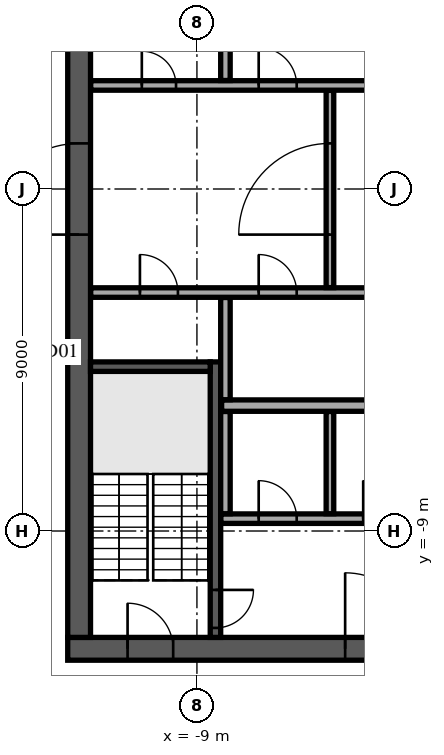
"""IFC4 building model, lengths in metres.
Left out: names, types, materials, properties, quantities, classifications, styles, units other than length and angle.
Written with IfcOpenShell. Run it as: python <this file> out.ifc"""

import sys

from ifc_helpers import new_model, si_unit, direction, frame, frame_2d, origin, place, context, subcontext, project, spatial, rectangle, extrude, element, fill, save


model = new_model("IFC4")
c1 = context("Model", 3, precision=1e-05, world=origin(), true_north=direction((0.0, 1.0)))
c2 = subcontext(c1, "Body", "Model", "MODEL_VIEW")
j1 = project(units=[si_unit("LENGTHUNIT", "METRE"), si_unit("PLANEANGLEUNIT", "RADIAN")], contexts=[c1])
p1 = place(None, origin())
s1 = spatial("IfcSite", under=j1, at=p1, CompositionType="ELEMENT")
p2 = place(p1, origin())
s2 = spatial("IfcBuilding", under=s1, at=p2, CompositionType="ELEMENT")
p3 = place(p2, frame((0.0, 0.0, 296.5)))
s3 = spatial("IfcBuildingStorey", under=s2, at=p3, CompositionType="ELEMENT", Elevation=296.5)
p4 = place(p3, frame((-12.4, -12.1, 0.0), z_axis=(0.0, 0.0, 1.0), x_axis=(1.0, 0.0, 0.0)))
e1 = element("IfcWall", 1, at=p4, inside=s3, PredefinedType="SHEAR", context=c2, shape_type="SweptSolid", body=[
    extrude(rectangle(XDim=24.8, YDim=0.6, at=frame_2d((12.4, 0.0))), origin(), (0.0, 0.0, 1.0), 3.65),
])
p5 = place(p4, frame((7.3, 0.0, 0.0)))
e2 = element("IfcOpeningElement", 2, at=p5, cuts=e1, PredefinedType="OPENING", context=c2, shape_type="SweptSolid", body=[
    extrude(rectangle(XDim=2.0, YDim=2.1, at=frame_2d((1.0, 1.05))), frame((0.0, 0.31, 0.0), z_axis=(0.0, -1.0, 0.0), x_axis=(1.0, 0.0, 0.0)), (0.0, 0.0, 1.0), 0.62),
])
p6 = place(p4, frame((17.425, 0.0, 0.0)))
e3 = element("IfcOpeningElement", 3, at=p6, cuts=e1, PredefinedType="OPENING", context=c2, shape_type="SweptSolid", body=[
    extrude(rectangle(XDim=1.2, YDim=2.1, at=frame_2d((0.6, 1.05))), frame((0.0, 0.31, 0.0), z_axis=(0.0, -1.0, 0.0), x_axis=(1.0, 0.0, 0.0)), (0.0, 0.0, 1.0), 0.62),
])
p7 = place(p4, frame((1.575, 0.0, 0.0)))
e4 = element("IfcOpeningElement", 4, at=p7, cuts=e1, PredefinedType="OPENING", context=c2, shape_type="SweptSolid", body=[
    extrude(rectangle(XDim=1.2, YDim=2.1, at=frame_2d((0.6, 1.05))), frame((0.0, 0.31, 0.0), z_axis=(0.0, -1.0, 0.0), x_axis=(1.0, 0.0, 0.0)), (0.0, 0.0, 1.0), 0.62),
])
p8 = place(p4, frame((22.025, 0.0, 0.0)))
e5 = element("IfcOpeningElement", 5, at=p8, cuts=e1, PredefinedType="OPENING", context=c2, shape_type="SweptSolid", body=[
    extrude(rectangle(XDim=1.2, YDim=2.1, at=frame_2d((0.6, 1.05))), frame((0.0, 0.31, 0.0), z_axis=(0.0, -1.0, 0.0), x_axis=(1.0, 0.0, 0.0)), (0.0, 0.0, 1.0), 0.62),
])
p9 = place(p3, frame((-12.1, -11.8, 0.0), z_axis=(0.0, 0.0, 1.0), x_axis=(0.0, 1.0, 0.0)))
e6 = element("IfcWall", 6, at=p9, inside=s3, PredefinedType="SHEAR", context=c2, shape_type="SweptSolid", body=[
    extrude(rectangle(XDim=23.6, YDim=0.6, at=frame_2d((11.8, 0.0))), origin(), (0.0, 0.0, 1.0), 3.65),
])
p10 = place(p9, frame((10.6, 0.0, 0.0)))
e7 = element("IfcOpeningElement", 7, at=p10, cuts=e6, PredefinedType="OPENING", context=c2, shape_type="SweptSolid", body=[
    extrude(rectangle(XDim=2.4, YDim=2.4, at=frame_2d((1.2, 1.2))), frame((0.0, 0.31, 0.0), z_axis=(0.0, -1.0, 0.0), x_axis=(1.0, 0.0, 0.0)), (0.0, 0.0, 1.0), 0.62),
])
p11 = place(p3, frame((-8.512, -4.55, 0.0), z_axis=(0.0, 0.0, 1.0), x_axis=(0.0, -1.0, 0.0)))
e8 = element("IfcWall", 8, at=p11, inside=s3, PredefinedType="SOLIDWALL", context=c2, shape_type="SweptSolid", body=[
    extrude(rectangle(XDim=7.25, YDim=0.275, at=frame_2d((3.625, 0.0))), origin(), (0.0, 0.0, 1.0), 3.65),
])
p12 = place(p11, frame((6.0, 0.0, 0.0)))
e9 = element("IfcOpeningElement", 9, at=p12, cuts=e8, PredefinedType="OPENING", context=c2, shape_type="SweptSolid", body=[
    extrude(rectangle(XDim=1.0, YDim=2.1, at=frame_2d((0.5, 1.05))), frame((0.0, 0.147, 0.0), z_axis=(0.0, -1.0, 0.0), x_axis=(1.0, 0.0, 0.0)), (0.0, 0.0, 1.0), 0.295),
])
p13 = place(p3, frame((-8.65, -4.675, 0.0), z_axis=(0.0, 0.0, 1.0), x_axis=(-1.0, 0.0, 0.0)))
e10 = element("IfcWall", 10, at=p13, inside=s3, PredefinedType="SOLIDWALL", context=c2, shape_type="SweptSolid", body=[
    extrude(rectangle(XDim=3.15, YDim=0.25, at=frame_2d((1.575, 0.0))), origin(), (0.0, 0.0, 1.0), 3.65),
])
p14 = place(p3, frame((-8.37, -8.675, 0.0), z_axis=(0.0, 0.0, 1.0), x_axis=(1.0, 0.0, 0.0)))
e11 = element("IfcWall", 11, at=p14, inside=s3, PredefinedType="PARTITIONING", context=c2, shape_type="SweptSolid", body=[
    extrude(rectangle(XDim=5.49, YDim=0.25, at=frame_2d((2.745, 0.0))), origin(), (0.0, 0.0, 1.0), 3.65),
])
p15 = place(p14, frame((0.995, 0.0, 0.0)))
e12 = element("IfcOpeningElement", 12, at=p15, cuts=e11, PredefinedType="OPENING", context=c2, shape_type="SweptSolid", body=[
    extrude(rectangle(XDim=1.0, YDim=2.1, at=frame_2d((0.5, 1.05))), frame((0.0, 0.135, 0.0), z_axis=(0.0, -1.0, 0.0), x_axis=(1.0, 0.0, 0.0)), (0.0, 0.0, 1.0), 0.27),
])
p16 = place(p14, frame((3.745, 0.0, 0.0)))
e13 = element("IfcOpeningElement", 13, at=p16, cuts=e11, PredefinedType="OPENING", context=c2, shape_type="SweptSolid", body=[
    extrude(rectangle(XDim=1.0, YDim=2.1, at=frame_2d((0.5, 1.05))), frame((0.0, 0.135, 0.0), z_axis=(0.0, -1.0, 0.0), x_axis=(1.0, 0.0, 0.0)), (0.0, 0.0, 1.0), 0.27),
])
p17 = place(p3, frame((-8.25, -8.545, 0.0), z_axis=(0.0, 0.0, 1.0), x_axis=(0.0, 1.0, 0.0)))
e14 = element("IfcWall", 14, at=p17, inside=s3, PredefinedType="PARTITIONING", context=c2, shape_type="SweptSolid", body=[
    extrude(rectangle(XDim=2.69, YDim=0.25, at=frame_2d((1.345, 0.0))), origin(), (0.0, 0.0, 1.0), 3.65),
])
p18 = place(p3, frame((-5.5, -8.545, 0.0), z_axis=(0.0, 0.0, 1.0), x_axis=(0.0, 1.0, 0.0)))
e15 = element("IfcWall", 15, at=p18, inside=s3, PredefinedType="PARTITIONING", context=c2, shape_type="SweptSolid", body=[
    extrude(rectangle(XDim=2.69, YDim=0.2, at=frame_2d((1.345, 0.0))), origin(), (0.0, 0.0, 1.0), 3.65),
])
p19 = place(p3, frame((-8.35, -5.7, 0.0), z_axis=(0.0, 0.0, 1.0), x_axis=(1.0, 0.0, 0.0)))
e16 = element("IfcWall", 16, at=p19, inside=s3, PredefinedType="PARTITIONING", context=c2, shape_type="SweptSolid", body=[
    extrude(rectangle(XDim=5.47, YDim=0.3, at=frame_2d((2.735, 0.0))), origin(), (0.0, 0.0, 1.0), 3.65),
])
p20 = place(p3, frame((-8.25, -5.545, 0.0), z_axis=(0.0, 0.0, 1.0), x_axis=(0.0, 1.0, 0.0)))
e17 = element("IfcWall", 17, at=p20, inside=s3, PredefinedType="PARTITIONING", context=c2, shape_type="SweptSolid", body=[
    extrude(rectangle(XDim=2.69, YDim=0.25, at=frame_2d((1.345, 0.0))), origin(), (0.0, 0.0, 1.0), 3.65),
])
p21 = place(p3, frame((-11.795, -2.725, 0.0), z_axis=(0.0, 0.0, 1.0), x_axis=(1.0, 0.0, 0.0)))
e18 = element("IfcWall", 18, at=p21, inside=s3, PredefinedType="PARTITIONING", context=c2, shape_type="SweptSolid", body=[
    extrude(rectangle(XDim=14.415, YDim=0.25, at=frame_2d((7.208, 0.0))), origin(), (0.0, 0.0, 1.0), 3.65),
])
p22 = place(p21, frame((1.295, 0.0, 0.0)))
e19 = element("IfcOpeningElement", 19, at=p22, cuts=e18, PredefinedType="OPENING", context=c2, shape_type="SweptSolid", body=[
    extrude(rectangle(XDim=1.0, YDim=2.1, at=frame_2d((0.5, 1.05))), frame((0.0, 0.135, 0.0), z_axis=(0.0, -1.0, 0.0), x_axis=(1.0, 0.0, 0.0)), (0.0, 0.0, 1.0), 0.27),
])
p23 = place(p21, frame((4.42, 0.0, 0.0)))
e20 = element("IfcOpeningElement", 20, at=p23, cuts=e18, PredefinedType="OPENING", context=c2, shape_type="SweptSolid", body=[
    extrude(rectangle(XDim=1.0, YDim=2.1, at=frame_2d((0.5, 1.05))), frame((0.0, 0.135, 0.0), z_axis=(0.0, -1.0, 0.0), x_axis=(1.0, 0.0, 0.0)), (0.0, 0.0, 1.0), 0.27),
])
p24 = place(p21, frame((9.92, 0.0, 0.0)))
e21 = element("IfcOpeningElement", 21, at=p24, cuts=e18, PredefinedType="OPENING", context=c2, shape_type="SweptSolid", body=[
    extrude(rectangle(XDim=1.0, YDim=2.1, at=frame_2d((0.5, 1.05))), frame((0.0, 0.135, 0.0), z_axis=(0.0, -1.0, 0.0), x_axis=(1.0, 0.0, 0.0)), (0.0, 0.0, 1.0), 0.27),
])
p25 = place(p3, frame((-5.5, -2.595, 0.0), z_axis=(0.0, 0.0, 1.0), x_axis=(0.0, 1.0, 0.0)))
e22 = element("IfcWall", 22, at=p25, inside=s3, PredefinedType="PARTITIONING", context=c2, shape_type="SweptSolid", body=[
    extrude(rectangle(XDim=5.19, YDim=0.2, at=frame_2d((2.595, 0.0))), origin(), (0.0, 0.0, 1.0), 3.65),
])
p26 = place(p25, frame((1.395, 0.0, 0.0)))
e23 = element("IfcOpeningElement", 23, at=p26, cuts=e22, PredefinedType="OPENING", context=c2, shape_type="SweptSolid", body=[
    extrude(rectangle(XDim=2.4, YDim=2.4, at=frame_2d((1.2, 1.2))), frame((0.0, 0.11, 0.0), z_axis=(0.0, -1.0, 0.0), x_axis=(1.0, 0.0, 0.0)), (0.0, 0.0, 1.0), 0.22),
])
p27 = place(p3, frame((-11.795, 2.725, 0.0), z_axis=(0.0, 0.0, 1.0), x_axis=(1.0, 0.0, 0.0)))
e24 = element("IfcWall", 24, at=p27, inside=s3, PredefinedType="PARTITIONING", context=c2, shape_type="SweptSolid", body=[
    extrude(rectangle(XDim=23.59, YDim=0.25, at=frame_2d((11.795, 0.0))), origin(), (0.0, 0.0, 1.0), 3.65),
])
p28 = place(p27, frame((21.345, 0.0, 0.0)))
e25 = element("IfcOpeningElement", 25, at=p28, cuts=e24, PredefinedType="OPENING", context=c2, shape_type="SweptSolid", body=[
    extrude(rectangle(XDim=0.9, YDim=2.1, at=frame_2d((0.45, 1.05))), frame((0.0, 0.135, 0.0), z_axis=(0.0, -1.0, 0.0), x_axis=(1.0, 0.0, 0.0)), (0.0, 0.0, 1.0), 0.27),
])
p29 = place(p27, frame((1.345, 0.0, 0.0)))
e26 = element("IfcOpeningElement", 26, at=p29, cuts=e24, PredefinedType="OPENING", context=c2, shape_type="SweptSolid", body=[
    extrude(rectangle(XDim=0.9, YDim=2.1, at=frame_2d((0.45, 1.05))), frame((0.0, 0.135, 0.0), z_axis=(0.0, -1.0, 0.0), x_axis=(1.0, 0.0, 0.0)), (0.0, 0.0, 1.0), 0.27),
])
p30 = place(p27, frame((4.42, 0.0, 0.0)))
e27 = element("IfcOpeningElement", 27, at=p30, cuts=e24, PredefinedType="OPENING", context=c2, shape_type="SweptSolid", body=[
    extrude(rectangle(XDim=1.0, YDim=2.1, at=frame_2d((0.5, 1.05))), frame((0.0, 0.135, 0.0), z_axis=(0.0, -1.0, 0.0), x_axis=(1.0, 0.0, 0.0)), (0.0, 0.0, 1.0), 0.27),
])
p31 = place(p27, frame((9.82, 0.0, 0.0)))
e28 = element("IfcOpeningElement", 28, at=p31, cuts=e24, PredefinedType="OPENING", context=c2, shape_type="SweptSolid", body=[
    extrude(rectangle(XDim=1.2, YDim=2.1, at=frame_2d((0.6, 1.05))), frame((0.0, 0.135, 0.0), z_axis=(0.0, -1.0, 0.0), x_axis=(1.0, 0.0, 0.0)), (0.0, 0.0, 1.0), 0.27),
])
p32 = place(p3, frame((-8.25, 2.855, 0.0), z_axis=(0.0, 0.0, 1.0), x_axis=(0.0, 1.0, 0.0)))
e29 = element("IfcWall", 29, at=p32, inside=s3, PredefinedType="PARTITIONING", context=c2, shape_type="SweptSolid", body=[
    extrude(rectangle(XDim=1.715, YDim=0.25, at=frame_2d((0.857, 0.0))), origin(), (0.0, 0.0, 1.0), 3.65),
])
p33 = place(p3, frame((-23.896, -11.711, 0.0), z_axis=(0.0, 0.0, 1.0), x_axis=(0.920507643781, -0.390724554821, 0.0)))
e30 = element("IfcWall", 30, at=p33, inside=s3, PredefinedType="PARTITIONING", context=c2, shape_type="SweptSolid", body=[
    extrude(rectangle(XDim=34.917, YDim=0.15, at=frame_2d((17.458, 0.0))), origin(), (0.0, 0.0, 1.0), 3.25),
])
p34 = place(p33, frame((7.05, 0.0, 0.0)))
e31 = element("IfcOpeningElement", 31, at=p34, cuts=e30, PredefinedType="OPENING", context=c2, shape_type="SweptSolid", body=[
    extrude(rectangle(XDim=1.8, YDim=2.1, at=frame_2d((0.9, 1.05))), frame((0.0, 0.085, 0.0), z_axis=(0.0, -1.0, 0.0), x_axis=(1.0, 0.0, 0.0)), (0.0, 0.0, 1.0), 0.17),
])
p35 = place(p33, frame((14.27, 0.0, 0.0)))
e32 = element("IfcOpeningElement", 32, at=p35, cuts=e30, PredefinedType="OPENING", context=c2, shape_type="SweptSolid", body=[
    extrude(rectangle(XDim=1.0, YDim=2.1, at=frame_2d((0.5, 1.05))), frame((0.0, 0.085, 0.0), z_axis=(0.0, -1.0, 0.0), x_axis=(1.0, 0.0, 0.0)), (0.0, 0.0, 1.0), 0.17),
])
p36 = place(p33, frame((29.011, 0.0, 0.0)))
e33 = element("IfcOpeningElement", 33, at=p36, cuts=e30, PredefinedType="OPENING", context=c2, shape_type="SweptSolid", body=[
    extrude(rectangle(XDim=1.0, YDim=2.1, at=frame_2d((0.5, 1.05))), frame((0.0, 0.085, 0.0), z_axis=(0.0, -1.0, 0.0), x_axis=(1.0, 0.0, 0.0)), (0.0, 0.0, 1.0), 0.17),
])
p37 = place(p5, origin())
e34 = element("IfcDoor", 34, at=p37, inside=s3, OperationType="SINGLE_SWING_LEFT", PredefinedType="DOOR", context=c2, shape_type="SweptSolid", body=[
    extrude(rectangle(XDim=2.0, YDim=2.1, at=frame_2d((1.0, 1.05))), frame((0.0, 0.025, 0.0), z_axis=(0.0, -1.0, 0.0), x_axis=(1.0, 0.0, 0.0)), (0.0, 0.0, 1.0), 0.05),
])
fill(e2, e34)
p38 = place(p7, origin())
e35 = element("IfcDoor", 35, at=p38, inside=s3, OperationType="SINGLE_SWING_LEFT", PredefinedType="DOOR", context=c2, shape_type="SweptSolid", body=[
    extrude(rectangle(XDim=1.2, YDim=2.1, at=frame_2d((0.6, 1.05))), frame((0.0, 0.025, 0.0), z_axis=(0.0, -1.0, 0.0), x_axis=(1.0, 0.0, 0.0)), (0.0, 0.0, 1.0), 0.05),
])
fill(e4, e35)
p39 = place(p10, origin())
e36 = element("IfcDoor", 36, at=p39, inside=s3, OperationType="SINGLE_SWING_LEFT", PredefinedType="DOOR", context=c2, shape_type="SweptSolid", body=[
    extrude(rectangle(XDim=2.4, YDim=2.4, at=frame_2d((1.2, 1.2))), frame((0.0, 0.025, 0.0), z_axis=(0.0, -1.0, 0.0), x_axis=(1.0, 0.0, 0.0)), (0.0, 0.0, 1.0), 0.05),
])
fill(e7, e36)
p40 = place(p12, origin())
e37 = element("IfcDoor", 37, at=p40, inside=s3, OperationType="SINGLE_SWING_LEFT", PredefinedType="DOOR", context=c2, shape_type="SweptSolid", body=[
    extrude(rectangle(XDim=1.0, YDim=2.1, at=frame_2d((0.5, 1.05))), frame((0.0, 0.025, 0.0), z_axis=(0.0, -1.0, 0.0), x_axis=(1.0, 0.0, 0.0)), (0.0, 0.0, 1.0), 0.05),
])
fill(e9, e37)
p41 = place(p15, origin())
e38 = element("IfcDoor", 38, at=p41, inside=s3, OperationType="SINGLE_SWING_LEFT", PredefinedType="DOOR", context=c2, shape_type="SweptSolid", body=[
    extrude(rectangle(XDim=1.0, YDim=2.1, at=frame_2d((0.5, 1.05))), frame((0.0, 0.025, 0.0), z_axis=(0.0, -1.0, 0.0), x_axis=(1.0, 0.0, 0.0)), (0.0, 0.0, 1.0), 0.05),
])
fill(e12, e38)
p42 = place(p16, origin())
e39 = element("IfcDoor", 39, at=p42, inside=s3, OperationType="SINGLE_SWING_LEFT", PredefinedType="DOOR", context=c2, shape_type="SweptSolid", body=[
    extrude(rectangle(XDim=1.0, YDim=2.1, at=frame_2d((0.5, 1.05))), frame((0.0, 0.025, 0.0), z_axis=(0.0, -1.0, 0.0), x_axis=(1.0, 0.0, 0.0)), (0.0, 0.0, 1.0), 0.05),
])
fill(e13, e39)
p43 = place(p22, origin())
e40 = element("IfcDoor", 40, at=p43, inside=s3, OperationType="SINGLE_SWING_LEFT", PredefinedType="DOOR", context=c2, shape_type="SweptSolid", body=[
    extrude(rectangle(XDim=1.0, YDim=2.1, at=frame_2d((0.5, 1.05))), frame((0.0, 0.025, 0.0), z_axis=(0.0, -1.0, 0.0), x_axis=(1.0, 0.0, 0.0)), (0.0, 0.0, 1.0), 0.05),
])
fill(e19, e40)
p44 = place(p29, origin())
e41 = element("IfcDoor", 41, at=p44, inside=s3, OperationType="SINGLE_SWING_LEFT", PredefinedType="DOOR", context=c2, shape_type="SweptSolid", body=[
    extrude(rectangle(XDim=0.9, YDim=2.1, at=frame_2d((0.45, 1.05))), frame((0.0, 0.025, 0.0), z_axis=(0.0, -1.0, 0.0), x_axis=(1.0, 0.0, 0.0)), (0.0, 0.0, 1.0), 0.05),
])
fill(e26, e41)
p45 = place(p30, origin())
e42 = element("IfcDoor", 42, at=p45, inside=s3, OperationType="SINGLE_SWING_LEFT", PredefinedType="DOOR", context=c2, shape_type="SweptSolid", body=[
    extrude(rectangle(XDim=1.0, YDim=2.1, at=frame_2d((0.5, 1.05))), frame((0.0, 0.025, 0.0), z_axis=(0.0, -1.0, 0.0), x_axis=(1.0, 0.0, 0.0)), (0.0, 0.0, 1.0), 0.05),
])
fill(e27, e42)
p46 = place(p23, origin())
e43 = element("IfcDoor", 43, at=p46, inside=s3, OperationType="SINGLE_SWING_LEFT", PredefinedType="DOOR", context=c2, shape_type="SweptSolid", body=[
    extrude(rectangle(XDim=1.0, YDim=2.1, at=frame_2d((0.5, 1.05))), frame((0.0, 0.025, 0.0), z_axis=(0.0, -1.0, 0.0), x_axis=(1.0, 0.0, 0.0)), (0.0, 0.0, 1.0), 0.05),
])
fill(e20, e43)
p47 = place(p26, origin())
e44 = element("IfcDoor", 44, at=p47, inside=s3, OperationType="SINGLE_SWING_LEFT", PredefinedType="DOOR", context=c2, shape_type="SweptSolid", body=[
    extrude(rectangle(XDim=2.4, YDim=2.4, at=frame_2d((1.2, 1.2))), frame((0.0, 0.025, 0.0), z_axis=(0.0, -1.0, 0.0), x_axis=(1.0, 0.0, 0.0)), (0.0, 0.0, 1.0), 0.05),
])
fill(e23, e44)
save(model, sys.argv[1])
